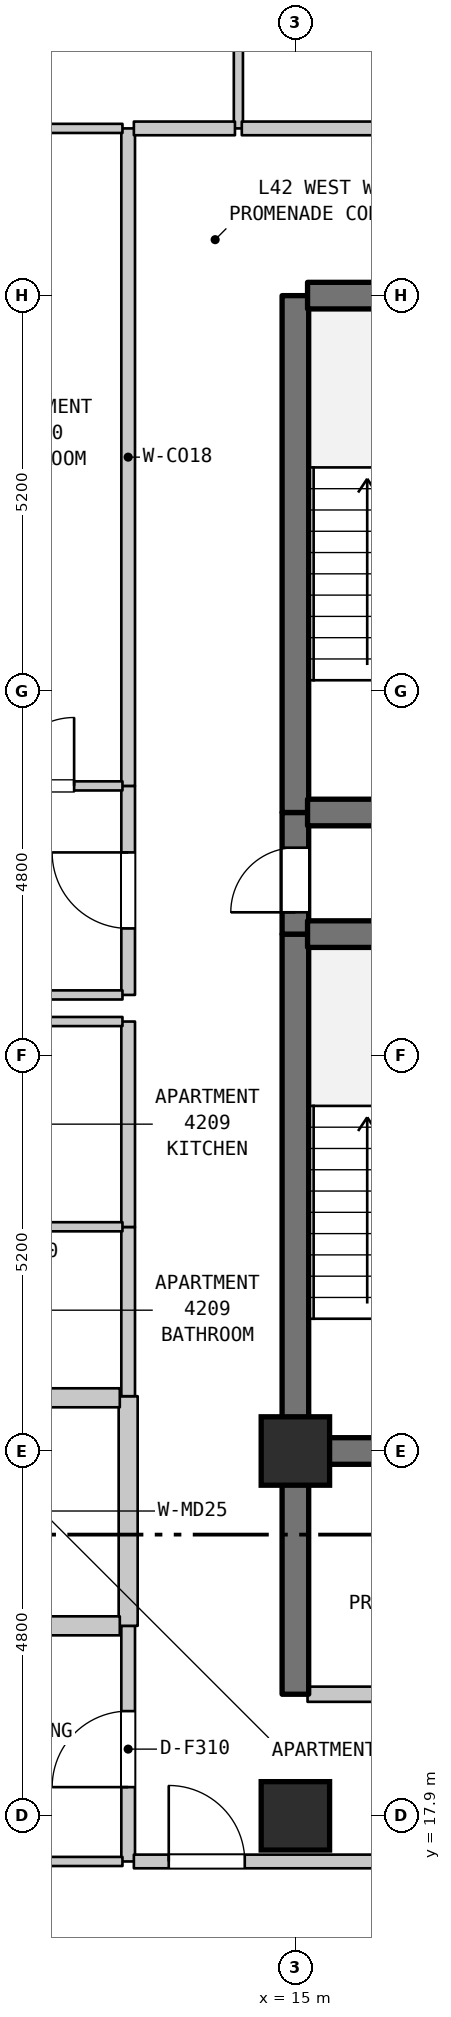
"""IFC4 building model, lengths in metres.
Left out: names, types, materials, properties, quantities, classifications, styles, units other than length and angle.
Written with IfcOpenShell. Run it as: python <this file> out.ifc"""

import sys

from ifc_helpers import new_model, si_unit, direction, frame, frame_2d, origin, origin_2d, place, context, subcontext, project, spatial, rectangle, extrude, element, fill, save


model = new_model("IFC4")
c1 = context("Model", 3, precision=1e-05, world=origin(), true_north=direction((0.0, 1.0)))
c2 = subcontext(c1, "Body", "Model", "MODEL_VIEW")
j1 = project(units=[si_unit("LENGTHUNIT", "METRE"), si_unit("PLANEANGLEUNIT", "RADIAN")], contexts=[c1])
p1 = place(None, origin())
s1 = spatial("IfcSite", under=j1, at=p1, CompositionType="ELEMENT")
p2 = place(p1, origin())
s2 = spatial("IfcBuilding", under=s1, at=p2, CompositionType="ELEMENT")
p3 = place(p2, frame((0.0, 0.0, 172.8)))
s3 = spatial("IfcBuildingStorey", under=s2, at=p3, CompositionType="ELEMENT", Elevation=172.8)
for number, where, z_axis, x_axis in (
    (1, (15.0, 17.9, 0.0), (0.0, 0.0, 1.0), (1.0, 0.0, 0.0)),
    (2, (15.0, 22.7, 0.0), (0.0, 0.0, 1.0), (1.0, 0.0, 0.0)),
):
    element("IfcColumn", number, at=place(p3, frame(where, z_axis=z_axis, x_axis=x_axis)), inside=s3, PredefinedType="COLUMN", context=c2, shape_type="SweptSolid", body=[
        extrude(rectangle(XDim=0.9, YDim=0.9, at=origin_2d()), origin(), (0.0, 0.0, 1.0), 3.7),
    ])
p4 = place(p3, frame((12.8, 17.3, 0.0), z_axis=(0.0, 0.0, 1.0), x_axis=(0.0, 1.0, 0.0)))
e3 = element("IfcWall", 3, at=p4, inside=s3, PredefinedType="STANDARD", context=c2, shape_type="SweptSolid", body=[
    extrude(rectangle(XDim=3.1, YDim=0.18, at=frame_2d((1.55, 0.0))), origin(), (0.0, 0.0, 1.0), 3.39),
])
p5 = place(p4, frame((0.978, 0.0, 0.0)))
e4 = element("IfcOpeningElement", 4, at=p5, cuts=e3, PredefinedType="OPENING", context=c2, shape_type="SweptSolid", body=[
    extrude(rectangle(XDim=1.0, YDim=2.15, at=frame_2d((0.5, 1.075))), frame((0.0, 0.1, 0.0), z_axis=(0.0, -1.0, 0.0), x_axis=(1.0, 0.0, 0.0)), (0.0, 0.0, 1.0), 0.2),
])
p6 = place(p3, frame((12.8, 20.4, 0.0), z_axis=(0.0, 0.0, 1.0), x_axis=(0.0, 1.0, 0.0)))
e5 = element("IfcWall", 5, at=p6, inside=s3, PredefinedType="STANDARD", context=c2, shape_type="SweptSolid", body=[
    extrude(rectangle(XDim=3.021, YDim=0.25, at=frame_2d((1.51, 0.0))), origin(), (0.0, 0.0, 1.0), 3.39),
])
p7 = place(p3, frame((12.8, 23.421, 0.0), z_axis=(0.0, 0.0, 1.0), x_axis=(0.0, 1.0, 0.0)))
e6 = element("IfcWall", 6, at=p7, inside=s3, PredefinedType="STANDARD", context=c2, shape_type="SweptSolid", body=[
    extrude(rectangle(XDim=2.226, YDim=0.18, at=frame_2d((1.113, 0.0))), origin(), (0.0, 0.0, 1.0), 3.39),
])
p8 = place(p3, frame((12.8, 25.647, 0.0), z_axis=(0.0, 0.0, 1.0), x_axis=(0.0, 1.0, 0.0)))
e7 = element("IfcWall", 7, at=p8, inside=s3, PredefinedType="STANDARD", context=c2, shape_type="SweptSolid", body=[
    extrude(rectangle(XDim=2.703, YDim=0.18, at=frame_2d((1.352, 0.0))), origin(), (0.0, 0.0, 1.0), 3.39),
])
p9 = place(p3, frame((12.8, 28.7, 0.0), z_axis=(0.0, 0.0, 1.0), x_axis=(0.0, 1.0, 0.0)))
e8 = element("IfcWall", 8, at=p9, inside=s3, PredefinedType="STANDARD", context=c2, shape_type="SweptSolid", body=[
    extrude(rectangle(XDim=2.75, YDim=0.18, at=frame_2d((1.375, 0.0))), origin(), (0.0, 0.0, 1.0), 3.39),
])
p10 = place(p9, frame((0.875, 0.0, 0.0)))
e9 = element("IfcOpeningElement", 9, at=p10, cuts=e8, PredefinedType="OPENING", context=c2, shape_type="SweptSolid", body=[
    extrude(rectangle(XDim=1.0, YDim=2.15, at=frame_2d((0.5, 1.075))), frame((0.0, 0.1, 0.0), z_axis=(0.0, -1.0, 0.0), x_axis=(1.0, 0.0, 0.0)), (0.0, 0.0, 1.0), 0.2),
])
p11 = place(p3, frame((12.8, 31.45, 0.0), z_axis=(0.0, 0.0, 1.0), x_axis=(0.0, 1.0, 0.0)))
e10 = element("IfcWall", 10, at=p11, inside=s3, PredefinedType="STANDARD", context=c2, shape_type="SweptSolid", body=[
    extrude(rectangle(XDim=8.65, YDim=0.18, at=frame_2d((4.325, 0.0))), origin(), (0.0, 0.0, 1.0), 3.39),
])
p12 = place(p3, frame((14.25, 40.1, 0.0), z_axis=(0.0, 0.0, 1.0), x_axis=(0.0, 1.0, 0.0)))
e11 = element("IfcWall", 11, at=p12, inside=s3, PredefinedType="PARTITIONING", context=c2, shape_type="SweptSolid", body=[
    extrude(rectangle(XDim=3.2, YDim=0.12, at=frame_2d((1.6, 0.0))), origin(), (0.0, 0.0, 1.0), 3.39),
])
p13 = place(p12, frame((1.15, 0.0, 0.0)))
e12 = element("IfcOpeningElement", 12, at=p13, cuts=e11, PredefinedType="OPENING", context=c2, shape_type="SweptSolid", body=[
    extrude(rectangle(XDim=0.9, YDim=2.15, at=frame_2d((0.45, 1.075))), frame((0.0, 0.07, 0.0), z_axis=(0.0, -1.0, 0.0), x_axis=(1.0, 0.0, 0.0)), (0.0, 0.0, 1.0), 0.14),
])
p14 = place(p3, frame((15.0, 19.5, 0.0), z_axis=(0.0, 0.0, 1.0), x_axis=(0.0, 1.0, 0.0)))
e13 = element("IfcWall", 13, at=p14, inside=s3, PredefinedType="SHEAR", context=c2, shape_type="SweptSolid", body=[
    extrude(rectangle(XDim=3.2, YDim=0.35, at=frame_2d((1.6, 0.0))), origin(), (0.0, 0.0, 1.0), 3.39),
])
p15 = place(p3, frame((15.0, 22.7, 0.0), z_axis=(0.0, 0.0, 1.0), x_axis=(0.0, 1.0, 0.0)))
e14 = element("IfcWall", 14, at=p15, inside=s3, PredefinedType="SHEAR", context=c2, shape_type="SweptSolid", body=[
    extrude(rectangle(XDim=6.8, YDim=0.35, at=frame_2d((3.4, 0.0))), origin(), (0.0, 0.0, 1.0), 3.39),
])
p16 = place(p3, frame((15.0, 29.5, 0.0), z_axis=(0.0, 0.0, 1.0), x_axis=(0.0, 1.0, 0.0)))
e15 = element("IfcWall", 15, at=p16, inside=s3, PredefinedType="SHEAR", context=c2, shape_type="SweptSolid", body=[
    extrude(rectangle(XDim=1.6, YDim=0.35, at=frame_2d((0.8, 0.0))), origin(), (0.0, 0.0, 1.0), 3.39),
])
p17 = place(p16, frame((0.287, 0.0, 0.0)))
e16 = element("IfcOpeningElement", 16, at=p17, cuts=e15, PredefinedType="OPENING", context=c2, shape_type="SweptSolid", body=[
    extrude(rectangle(XDim=0.85, YDim=2.1, at=frame_2d((0.425, 1.05))), frame((0.0, 0.185, 0.0), z_axis=(0.0, -1.0, 0.0), x_axis=(1.0, 0.0, 0.0)), (0.0, 0.0, 1.0), 0.37),
])
p18 = place(p3, frame((15.0, 31.1, 0.0), z_axis=(0.0, 0.0, 1.0), x_axis=(0.0, 1.0, 0.0)))
e17 = element("IfcWall", 17, at=p18, inside=s3, PredefinedType="SHEAR", context=c2, shape_type="SweptSolid", body=[
    extrude(rectangle(XDim=6.8, YDim=0.35, at=frame_2d((3.4, 0.0))), origin(), (0.0, 0.0, 1.0), 3.39),
])
p19 = place(p3, frame((9.085, 17.3, 0.0), z_axis=(0.0, 0.0, 1.0), x_axis=(1.0, 0.0, 0.0)))
e18 = element("IfcWall", 18, at=p19, inside=s3, PredefinedType="PARTITIONING", context=c2, shape_type="SweptSolid", body=[
    extrude(rectangle(XDim=3.64, YDim=0.12, at=frame_2d((1.82, 0.0))), origin(), (0.0, 0.0, 1.0), 3.39),
])
p20 = place(p3, frame((12.875, 17.3, 0.0), z_axis=(0.0, 0.0, 1.0), x_axis=(1.0, 0.0, 0.0)))
e19 = element("IfcWall", 19, at=p20, inside=s3, PredefinedType="STANDARD", context=c2, shape_type="SweptSolid", body=[
    extrude(rectangle(XDim=3.5, YDim=0.18, at=frame_2d((1.75, 0.0))), origin(), (0.0, 0.0, 1.0), 3.39),
])
p21 = place(p20, frame((0.459, 0.0, 0.0)))
e20 = element("IfcOpeningElement", 20, at=p21, cuts=e19, PredefinedType="OPENING", context=c2, shape_type="SweptSolid", body=[
    extrude(rectangle(XDim=1.0, YDim=2.15, at=frame_2d((0.5, 1.075))), frame((0.0, 0.1, 0.0), z_axis=(0.0, -1.0, 0.0), x_axis=(1.0, 0.0, 0.0)), (0.0, 0.0, 1.0), 0.2),
])
p22 = place(p3, frame((15.16, 19.5, 0.0), z_axis=(0.0, 0.0, 1.0), x_axis=(1.0, 0.0, 0.0)))
e21 = element("IfcWall", 21, at=p22, inside=s3, PredefinedType="STANDARD", context=c2, shape_type="SweptSolid", body=[
    extrude(rectangle(XDim=3.68, YDim=0.2, at=frame_2d((1.84, 0.0))), origin(), (0.0, 0.0, 1.0), 3.39),
])
p23 = place(p22, frame((1.39, 0.0, 0.0)))
e22 = element("IfcOpeningElement", 22, at=p23, cuts=e21, PredefinedType="OPENING", context=c2, shape_type="SweptSolid", body=[
    extrude(rectangle(XDim=0.9, YDim=2.15, at=frame_2d((0.45, 1.075))), frame((0.0, 0.11, 0.0), z_axis=(0.0, -1.0, 0.0), x_axis=(1.0, 0.0, 0.0)), (0.0, 0.0, 1.0), 0.22),
])
p24 = place(p3, frame((10.66, 20.4, 0.0), z_axis=(0.0, 0.0, 1.0), x_axis=(1.0, 0.0, 0.0)))
e23 = element("IfcWall", 23, at=p24, inside=s3, PredefinedType="STANDARD", context=c2, shape_type="SweptSolid", body=[
    extrude(rectangle(XDim=2.03, YDim=0.25, at=frame_2d((1.015, 0.0))), origin(), (0.0, 0.0, 1.0), 3.39),
])
p25 = place(p3, frame((15.16, 22.7, 0.0), z_axis=(0.0, 0.0, 1.0), x_axis=(1.0, 0.0, 0.0)))
e24 = element("IfcWall", 24, at=p25, inside=s3, PredefinedType="SHEAR", context=c2, shape_type="SweptSolid", body=[
    extrude(rectangle(XDim=3.68, YDim=0.35, at=frame_2d((1.84, 0.0))), origin(), (0.0, 0.0, 1.0), 3.39),
])
p26 = place(p3, frame((10.66, 23.4, 0.0), z_axis=(0.0, 0.0, 1.0), x_axis=(1.0, 0.0, 0.0)))
e25 = element("IfcWall", 25, at=p26, inside=s3, PredefinedType="STANDARD", context=c2, shape_type="SweptSolid", body=[
    extrude(rectangle(XDim=2.03, YDim=0.25, at=frame_2d((1.015, 0.0))), origin(), (0.0, 0.0, 1.0), 3.39),
])
for number, where, z_axis, x_axis in (
    (26, (10.595, 25.65, 0.0), (0.0, 0.0, 1.0), (1.0, 0.0, 0.0)),
    (27, (10.595, 28.35, 0.0), (0.0, 0.0, 1.0), (1.0, 0.0, 0.0)),
):
    element("IfcWall", number, at=place(p3, frame(where, z_axis=z_axis, x_axis=x_axis)), inside=s3, PredefinedType="PARTITIONING", context=c2, shape_type="SweptSolid", body=[
        extrude(rectangle(XDim=2.13, YDim=0.12, at=frame_2d((1.065, 0.0))), origin(), (0.0, 0.0, 1.0), 3.39),
    ])
p27 = place(p3, frame((9.03, 28.7, 0.0), z_axis=(0.0, 0.0, 1.0), x_axis=(1.0, 0.0, 0.0)))
e28 = element("IfcWall", 28, at=p27, inside=s3, PredefinedType="PARTITIONING", context=c2, shape_type="SweptSolid", body=[
    extrude(rectangle(XDim=3.695, YDim=0.12, at=frame_2d((1.848, 0.0))), origin(), (0.0, 0.0, 1.0), 3.39),
])
for number, where, z_axis, x_axis in (
    (29, (15.16, 29.5, 0.0), (0.0, 0.0, 1.0), (1.0, 0.0, 0.0)),
    (30, (15.16, 31.1, 0.0), (0.0, 0.0, 1.0), (1.0, 0.0, 0.0)),
):
    element("IfcWall", number, at=place(p3, frame(where, z_axis=z_axis, x_axis=x_axis)), inside=s3, PredefinedType="SHEAR", context=c2, shape_type="SweptSolid", body=[
        extrude(rectangle(XDim=3.68, YDim=0.35, at=frame_2d((1.84, 0.0))), origin(), (0.0, 0.0, 1.0), 3.39),
    ])
p28 = place(p3, frame((10.523, 31.45, 0.0), z_axis=(0.0, 0.0, 1.0), x_axis=(1.0, 0.0, 0.0)))
e31 = element("IfcWall", 31, at=p28, inside=s3, PredefinedType="PARTITIONING", context=c2, shape_type="SweptSolid", body=[
    extrude(rectangle(XDim=2.202, YDim=0.12, at=frame_2d((1.101, 0.0))), origin(), (0.0, 0.0, 1.0), 3.39),
])
p29 = place(p28, frame((0.666, 0.0, 0.0)))
e32 = element("IfcOpeningElement", 32, at=p29, cuts=e31, PredefinedType="OPENING", context=c2, shape_type="SweptSolid", body=[
    extrude(rectangle(XDim=0.9, YDim=2.1, at=frame_2d((0.45, 1.05))), frame((0.0, 0.07, 0.0), z_axis=(0.0, -1.0, 0.0), x_axis=(1.0, 0.0, 0.0)), (0.0, 0.0, 1.0), 0.14),
])
p30 = place(p3, frame((15.16, 37.9, 0.0), z_axis=(0.0, 0.0, 1.0), x_axis=(1.0, 0.0, 0.0)))
e33 = element("IfcWall", 33, at=p30, inside=s3, PredefinedType="SHEAR", context=c2, shape_type="SweptSolid", body=[
    extrude(rectangle(XDim=3.68, YDim=0.35, at=frame_2d((1.84, 0.0))), origin(), (0.0, 0.0, 1.0), 3.39),
])
p31 = place(p3, frame((10.523, 40.1, 0.0), z_axis=(0.0, 0.0, 1.0), x_axis=(1.0, 0.0, 0.0)))
e34 = element("IfcWall", 34, at=p31, inside=s3, PredefinedType="PARTITIONING", context=c2, shape_type="SweptSolid", body=[
    extrude(rectangle(XDim=2.202, YDim=0.12, at=frame_2d((1.101, 0.0))), origin(), (0.0, 0.0, 1.0), 3.39),
])
p32 = place(p3, frame((12.875, 40.1, 0.0), z_axis=(0.0, 0.0, 1.0), x_axis=(1.0, 0.0, 0.0)))
e35 = element("IfcWall", 35, at=p32, inside=s3, PredefinedType="STANDARD", context=c2, shape_type="SweptSolid", body=[
    extrude(rectangle(XDim=1.33, YDim=0.18, at=frame_2d((0.665, 0.0))), origin(), (0.0, 0.0, 1.0), 3.39),
])
p33 = place(p3, frame((14.295, 40.1, 0.0), z_axis=(0.0, 0.0, 1.0), x_axis=(1.0, 0.0, 0.0)))
e36 = element("IfcWall", 36, at=p33, inside=s3, PredefinedType="STANDARD", context=c2, shape_type="SweptSolid", body=[
    extrude(rectangle(XDim=2.26, YDim=0.18, at=frame_2d((1.13, 0.0))), origin(), (0.0, 0.0, 1.0), 3.39),
])
p34 = place(p5, origin())
e37 = element("IfcDoor", 37, at=p34, inside=s3, OperationType="SINGLE_SWING_LEFT", PredefinedType="DOOR", context=c2, shape_type="SweptSolid", body=[
    extrude(rectangle(XDim=1.0, YDim=2.15, at=frame_2d((0.5, 1.075))), frame((0.0, 0.025, 0.0), z_axis=(0.0, -1.0, 0.0), x_axis=(1.0, 0.0, 0.0)), (0.0, 0.0, 1.0), 0.05),
])
fill(e4, e37)
p35 = place(p10, origin())
e38 = element("IfcDoor", 38, at=p35, inside=s3, OperationType="SINGLE_SWING_RIGHT", PredefinedType="DOOR", context=c2, shape_type="SweptSolid", body=[
    extrude(rectangle(XDim=1.0, YDim=2.15, at=frame_2d((0.5, 1.075))), frame((0.0, 0.025, 0.0), z_axis=(0.0, -1.0, 0.0), x_axis=(1.0, 0.0, 0.0)), (0.0, 0.0, 1.0), 0.05),
])
fill(e9, e38)
p36 = place(p17, origin())
e39 = element("IfcDoor", 39, at=p36, inside=s3, OperationType="SINGLE_SWING_LEFT", PredefinedType="DOOR", context=c2, shape_type="SweptSolid", body=[
    extrude(rectangle(XDim=0.85, YDim=2.1, at=frame_2d((0.425, 1.05))), frame((0.0, 0.025, 0.0), z_axis=(0.0, -1.0, 0.0), x_axis=(1.0, 0.0, 0.0)), (0.0, 0.0, 1.0), 0.05),
])
fill(e16, e39)
p37 = place(p21, origin())
e40 = element("IfcDoor", 40, at=p37, inside=s3, OperationType="SINGLE_SWING_LEFT", PredefinedType="DOOR", context=c2, shape_type="SweptSolid", body=[
    extrude(rectangle(XDim=1.0, YDim=2.15, at=frame_2d((0.5, 1.075))), frame((0.0, 0.025, 0.0), z_axis=(0.0, -1.0, 0.0), x_axis=(1.0, 0.0, 0.0)), (0.0, 0.0, 1.0), 0.05),
])
fill(e20, e40)
p38 = place(p29, origin())
e41 = element("IfcDoor", 41, at=p38, inside=s3, OperationType="SINGLE_SWING_RIGHT", PredefinedType="DOOR", context=c2, shape_type="SweptSolid", body=[
    extrude(rectangle(XDim=0.9, YDim=2.1, at=frame_2d((0.45, 1.05))), frame((0.0, 0.025, 0.0), z_axis=(0.0, -1.0, 0.0), x_axis=(1.0, 0.0, 0.0)), (0.0, 0.0, 1.0), 0.05),
])
fill(e32, e41)
save(model, sys.argv[1])
